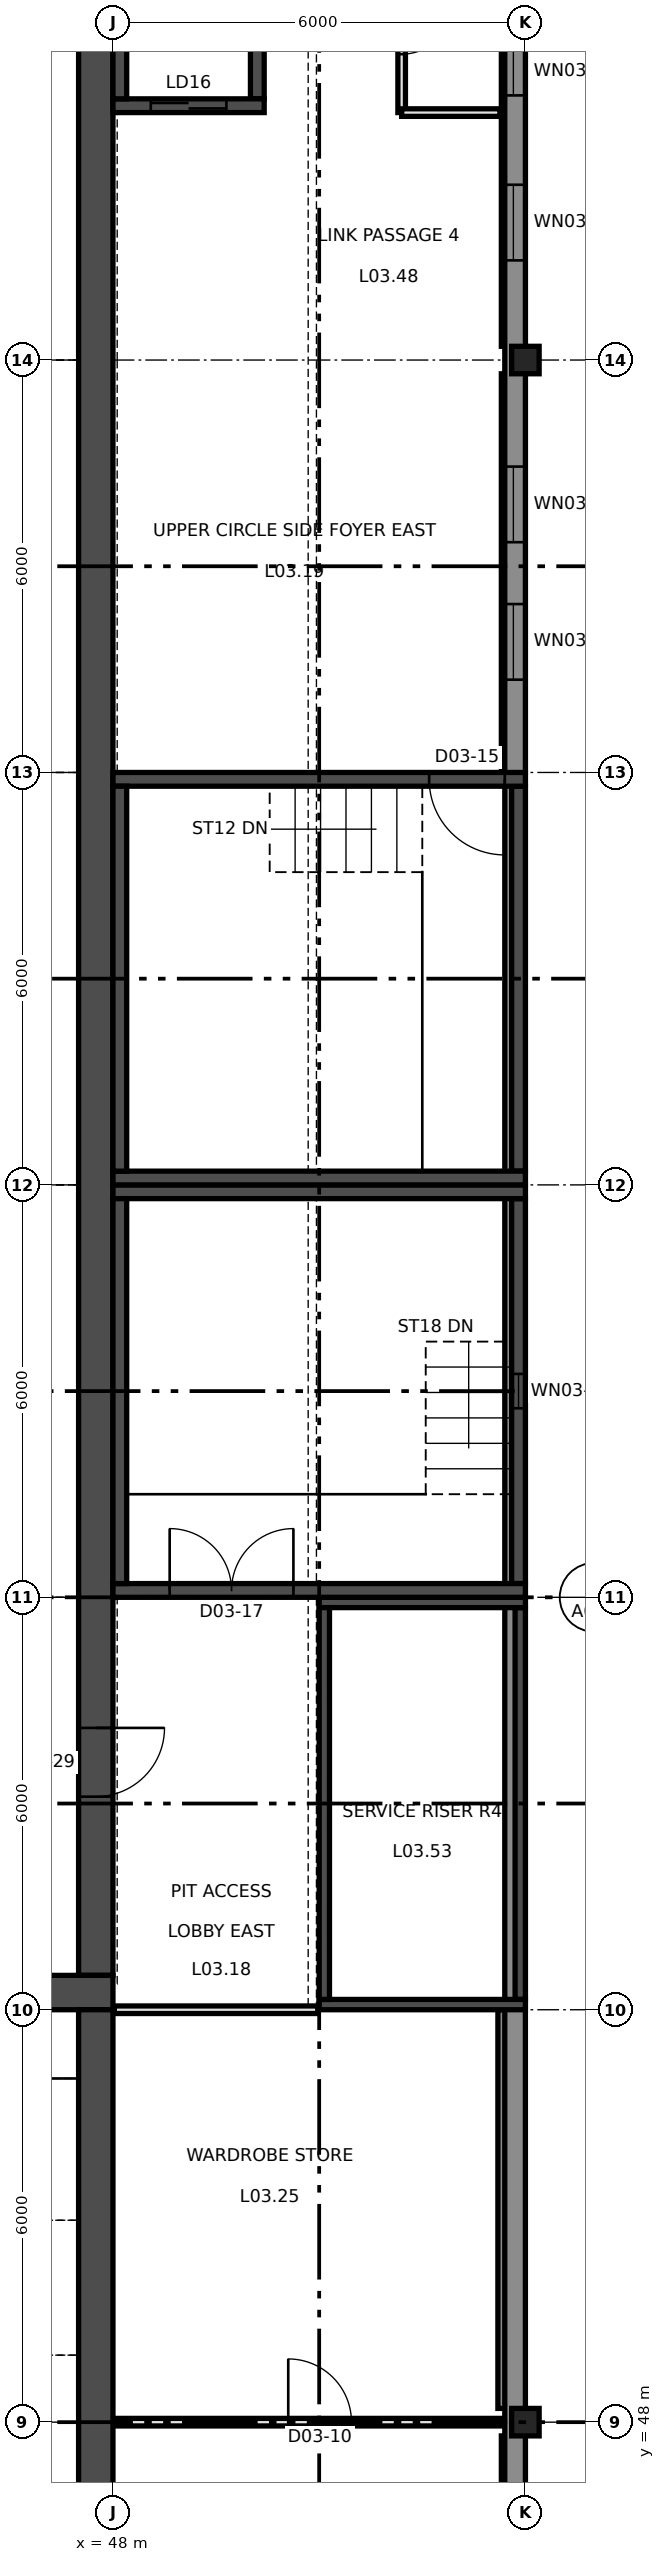
"""IFC4 building model, lengths in metres.
Left out: names, types, materials, properties, quantities, classifications, styles, units other than length and angle.
Written with IfcOpenShell. Run it as: python <this file> out.ifc"""

import sys

from ifc_helpers import new_model, si_unit, direction, frame, frame_2d, origin, origin_2d, place, context, subcontext, project, spatial, rectangle, extrude, element, fill, save


model = new_model("IFC4")
c1 = context("Model", 3, precision=1e-05, world=origin(), true_north=direction((0.0, 1.0)))
c2 = subcontext(c1, "Body", "Model", "MODEL_VIEW")
j1 = project(units=[si_unit("LENGTHUNIT", "METRE"), si_unit("PLANEANGLEUNIT", "RADIAN")], contexts=[c1])
p1 = place(None, origin())
s1 = spatial("IfcSite", under=j1, at=p1, CompositionType="ELEMENT")
p2 = place(p1, origin())
s2 = spatial("IfcBuilding", under=s1, at=p2, CompositionType="ELEMENT")
p3 = place(p2, frame((0.0, 0.0, 16.5)))
s3 = spatial("IfcBuildingStorey", under=s2, at=p3, CompositionType="ELEMENT", Elevation=16.5)
for number, where, z_axis, x_axis in (
    (1, (54.0, 48.0, 0.0), (0.0, 0.0, 1.0), (1.0, 0.0, 0.0)),
    (2, (54.0, 78.0, 0.0), (0.0, 0.0, 1.0), (1.0, 0.0, 0.0)),
):
    element("IfcColumn", number, at=place(p3, frame(where, z_axis=z_axis, x_axis=x_axis)), inside=s3, PredefinedType="COLUMN", context=c2, shape_type="SweptSolid", body=[
        extrude(rectangle(XDim=0.4, YDim=0.4, at=origin_2d()), origin(), (0.0, 0.0, 1.0), 4.5),
    ])
p4 = place(p3, frame((48.0, 71.9, 0.0), z_axis=(0.0, 0.0, 1.0), x_axis=(1.0, 0.0, 0.0)))
e3 = element("IfcWall", 3, at=p4, inside=s3, PredefinedType="SHEAR", context=c2, shape_type="SweptSolid", body=[
    extrude(rectangle(XDim=6.0, YDim=0.2, at=frame_2d((3.0, 0.0))), origin(), (0.0, 0.0, 1.0), 4.422),
])
p5 = place(p4, frame((4.6, 0.0, 0.0)))
e4 = element("IfcOpeningElement", 4, at=p5, cuts=e3, PredefinedType="OPENING", context=c2, shape_type="SweptSolid", body=[
    extrude(rectangle(XDim=1.1, YDim=2.2, at=frame_2d((0.55, 1.1))), frame((0.0, 0.11, 0.0), z_axis=(0.0, -1.0, 0.0), x_axis=(1.0, 0.0, 0.0)), (0.0, 0.0, 1.0), 0.22),
])
p6 = place(p3, frame((48.0, 66.1, 0.0), z_axis=(0.0, 0.0, 1.0), x_axis=(1.0, 0.0, 0.0)))
e5 = element("IfcWall", 5, at=p6, inside=s3, PredefinedType="SHEAR", context=c2, shape_type="SweptSolid", body=[
    extrude(rectangle(XDim=6.0, YDim=0.2, at=frame_2d((3.0, 0.0))), origin(), (0.0, 0.0, 1.0), 4.422),
])
p7 = place(p3, frame((48.1, 66.2, 0.0), z_axis=(0.0, 0.0, 1.0), x_axis=(0.0, 1.0, 0.0)))
e6 = element("IfcWall", 6, at=p7, inside=s3, PredefinedType="SHEAR", context=c2, shape_type="SweptSolid", body=[
    extrude(rectangle(XDim=5.6, YDim=0.2, at=frame_2d((2.8, 0.0))), origin(), (0.0, 0.0, 1.0), 4.422),
])
p8 = place(p3, frame((53.9, 66.2, 0.0), z_axis=(0.0, 0.0, 1.0), x_axis=(0.0, 1.0, 0.0)))
e7 = element("IfcWall", 7, at=p8, inside=s3, PredefinedType="SHEAR", context=c2, shape_type="SweptSolid", body=[
    extrude(rectangle(XDim=5.6, YDim=0.2, at=frame_2d((2.8, 0.0))), origin(), (0.0, 0.0, 1.0), 4.5),
])
p9 = place(p3, frame((48.0, 65.9, 0.0), z_axis=(0.0, 0.0, 1.0), x_axis=(1.0, 0.0, 0.0)))
e8 = element("IfcWall", 8, at=p9, inside=s3, PredefinedType="SHEAR", context=c2, shape_type="SweptSolid", body=[
    extrude(rectangle(XDim=6.0, YDim=0.2, at=frame_2d((3.0, 0.0))), origin(), (0.0, 0.0, 1.0), 4.422),
])
p10 = place(p3, frame((48.0, 60.1, 0.0), z_axis=(0.0, 0.0, 1.0), x_axis=(1.0, 0.0, 0.0)))
e9 = element("IfcWall", 9, at=p10, inside=s3, PredefinedType="SHEAR", context=c2, shape_type="SweptSolid", body=[
    extrude(rectangle(XDim=6.0, YDim=0.2, at=frame_2d((3.0, 0.0))), origin(), (0.0, 0.0, 1.0), 4.422),
])
p11 = place(p10, frame((0.825, 0.0, 0.0)))
e10 = element("IfcOpeningElement", 10, at=p11, cuts=e9, PredefinedType="OPENING", context=c2, shape_type="SweptSolid", body=[
    extrude(rectangle(XDim=1.8, YDim=2.2, at=frame_2d((0.9, 1.1))), frame((0.0, 0.11, 0.0), z_axis=(0.0, -1.0, 0.0), x_axis=(1.0, 0.0, 0.0)), (0.0, 0.0, 1.0), 0.22),
])
p12 = place(p3, frame((48.1, 60.2, 0.0), z_axis=(0.0, 0.0, 1.0), x_axis=(0.0, 1.0, 0.0)))
e11 = element("IfcWall", 11, at=p12, inside=s3, PredefinedType="SHEAR", context=c2, shape_type="SweptSolid", body=[
    extrude(rectangle(XDim=5.6, YDim=0.2, at=frame_2d((2.8, 0.0))), origin(), (0.0, 0.0, 1.0), 4.422),
])
p13 = place(p3, frame((53.9, 60.2, 0.0), z_axis=(0.0, 0.0, 1.0), x_axis=(0.0, 1.0, 0.0)))
e12 = element("IfcWall", 12, at=p13, inside=s3, PredefinedType="SHEAR", context=c2, shape_type="SweptSolid", body=[
    extrude(rectangle(XDim=5.6, YDim=0.2, at=frame_2d((2.8, 0.0))), origin(), (0.0, 0.0, 1.0), 4.5),
])
p14 = place(p13, frame((2.55, 0.0, 0.9)))
e13 = element("IfcOpeningElement", 13, at=p14, cuts=e12, PredefinedType="OPENING", context=c2, shape_type="SweptSolid", body=[
    extrude(rectangle(XDim=0.5, YDim=2.1, at=frame_2d((0.25, 1.05))), frame((0.0, 0.11, 0.0), z_axis=(0.0, -1.0, 0.0), x_axis=(1.0, 0.0, 0.0)), (0.0, 0.0, 1.0), 0.22),
])
p15 = place(p3, frame((48.0, 81.7, 0.0), z_axis=(0.0, 0.0, 1.0), x_axis=(1.0, 0.0, 0.0)))
e14 = element("IfcWall", 14, at=p15, inside=s3, PredefinedType="SHEAR", context=c2, shape_type="SweptSolid", body=[
    extrude(rectangle(XDim=2.2, YDim=0.2, at=frame_2d((1.1, 0.0))), origin(), (0.0, 0.0, 1.0), 4.422),
])
p16 = place(p15, frame((0.55, 0.0, 0.0)))
e15 = element("IfcOpeningElement", 15, at=p16, cuts=e14, PredefinedType="OPENING", context=c2, shape_type="SweptSolid", body=[
    extrude(rectangle(XDim=1.1, YDim=2.1, at=frame_2d((0.55, 1.05))), frame((0.0, 0.11, 0.0), z_axis=(0.0, -1.0, 0.0), x_axis=(1.0, 0.0, 0.0)), (0.0, 0.0, 1.0), 0.22),
])
p17 = place(p3, frame((48.1, 81.8, 0.0), z_axis=(0.0, 0.0, 1.0), x_axis=(0.0, 1.0, 0.0)))
e16 = element("IfcWall", 16, at=p17, inside=s3, PredefinedType="SHEAR", context=c2, shape_type="SweptSolid", body=[
    extrude(rectangle(XDim=2.0, YDim=0.2, at=frame_2d((1.0, 0.0))), origin(), (0.0, 0.0, 1.0), 4.422),
])
p18 = place(p3, frame((50.1, 81.8, 0.0), z_axis=(0.0, 0.0, 1.0), x_axis=(0.0, 1.0, 0.0)))
e17 = element("IfcWall", 17, at=p18, inside=s3, PredefinedType="SHEAR", context=c2, shape_type="SweptSolid", body=[
    extrude(rectangle(XDim=2.0, YDim=0.2, at=frame_2d((1.0, 0.0))), origin(), (0.0, 0.0, 1.0), 4.5),
])
for number, where, z_axis, x_axis in (
    (18, (51.0, 59.925, 0.0), (0.0, 0.0, 1.0), (1.0, 0.0, 0.0)),
    (19, (51.0, 54.075, 0.0), (0.0, 0.0, 1.0), (1.0, 0.0, 0.0)),
):
    element("IfcWall", number, at=place(p3, frame(where, z_axis=z_axis, x_axis=x_axis)), inside=s3, PredefinedType="SHEAR", context=c2, shape_type="SweptSolid", body=[
        extrude(rectangle(XDim=3.0, YDim=0.15, at=frame_2d((1.5, 0.0))), origin(), (0.0, 0.0, 1.0), 4.5),
    ])
for number, where, z_axis, x_axis in (
    (20, (51.075, 54.15, 0.0), (0.0, 0.0, 1.0), (0.0, 1.0, 0.0)),
    (21, (53.925, 54.15, 0.0), (0.0, 0.0, 1.0), (0.0, 1.0, 0.0)),
):
    element("IfcWall", number, at=place(p3, frame(where, z_axis=z_axis, x_axis=x_axis)), inside=s3, PredefinedType="SHEAR", context=c2, shape_type="SweptSolid", body=[
        extrude(rectangle(XDim=5.7, YDim=0.15, at=frame_2d((2.85, 0.0))), origin(), (0.0, 0.0, 1.0), 4.5),
    ])
p19 = place(p3, frame((47.75, 54.5, 0.0), z_axis=(0.0, 0.0, 1.0), x_axis=(0.0, 1.0, 0.0)))
e22 = element("IfcWall", 22, at=p19, inside=s3, PredefinedType="SHEAR", context=c2, shape_type="SweptSolid", body=[
    extrude(rectangle(XDim=35.5, YDim=0.5, at=frame_2d((17.75, 0.0))), origin(), (0.0, 0.0, 1.0), 3.9),
])
p20 = place(p19, frame((29.35, 0.0, 0.0)))
e23 = element("IfcOpeningElement", 23, at=p20, cuts=e22, PredefinedType="OPENING", context=c2, shape_type="SweptSolid", body=[
    extrude(rectangle(XDim=1.3, YDim=2.1, at=frame_2d((0.65, 1.05))), frame((0.0, 0.26, 0.0), z_axis=(0.0, -1.0, 0.0), x_axis=(1.0, 0.0, 0.0)), (0.0, 0.0, 1.0), 0.52),
])
p21 = place(p19, frame((2.6, 0.0, 0.0)))
e24 = element("IfcOpeningElement", 24, at=p21, cuts=e22, PredefinedType="OPENING", context=c2, shape_type="SweptSolid", body=[
    extrude(rectangle(XDim=1.0, YDim=2.1, at=frame_2d((0.5, 1.05))), frame((0.0, 0.26, 0.0), z_axis=(0.0, -1.0, 0.0), x_axis=(1.0, 0.0, 0.0)), (0.0, 0.0, 1.0), 0.52),
])
p22 = place(p3, frame((47.75, 30.0, 0.0), z_axis=(0.0, 0.0, 1.0), x_axis=(0.0, 1.0, 0.0)))
e25 = element("IfcWall", 25, at=p22, inside=s3, PredefinedType="SHEAR", context=c2, shape_type="SweptSolid", body=[
    extrude(rectangle(XDim=24.0, YDim=0.5, at=frame_2d((12.0, 0.0))), origin(), (0.0, 0.0, 1.0), 6.5),
])
p23 = place(p3, frame((18.0, 54.25, 0.0), z_axis=(0.0, 0.0, 1.0), x_axis=(1.0, 0.0, 0.0)))
e26 = element("IfcWall", 26, at=p23, inside=s3, PredefinedType="SHEAR", context=c2, shape_type="SweptSolid", body=[
    extrude(rectangle(XDim=30.0, YDim=0.5, at=frame_2d((15.0, 0.0))), origin(), (0.0, 0.0, 1.0), 6.5),
])
p24 = place(p3, frame((53.825, 83.8, 0.0), z_axis=(0.0, 0.0, 1.0), x_axis=(0.0, -1.0, 0.0)))
e27 = element("IfcWall", 27, at=p24, inside=s3, PredefinedType="SOLIDWALL", context=c2, shape_type="SweptSolid", body=[
    extrude(rectangle(XDim=5.6, YDim=0.35, at=frame_2d((2.8, 0.0))), origin(), (0.0, 0.0, 1.0), 3.9),
])
p25 = place(p24, frame((1.25, 0.0, 2.4)))
e28 = element("IfcOpeningElement", 28, at=p25, cuts=e27, PredefinedType="OPENING", context=c2, shape_type="SweptSolid", body=[
    extrude(rectangle(XDim=0.7, YDim=1.1, at=frame_2d((0.35, 0.55))), frame((0.0, 0.185, 0.0), z_axis=(0.0, -1.0, 0.0), x_axis=(1.0, 0.0, 0.0)), (0.0, 0.0, 1.0), 0.37),
])
p26 = place(p24, frame((3.25, 0.0, 2.4)))
e29 = element("IfcOpeningElement", 29, at=p26, cuts=e27, PredefinedType="OPENING", context=c2, shape_type="SweptSolid", body=[
    extrude(rectangle(XDim=1.1, YDim=1.1, at=frame_2d((0.55, 0.55))), frame((0.0, 0.185, 0.0), z_axis=(0.0, -1.0, 0.0), x_axis=(1.0, 0.0, 0.0)), (0.0, 0.0, 1.0), 0.37),
])
p27 = place(p3, frame((53.825, 77.8, 0.0), z_axis=(0.0, 0.0, 1.0), x_axis=(0.0, -1.0, 0.0)))
e30 = element("IfcWall", 30, at=p27, inside=s3, PredefinedType="SOLIDWALL", context=c2, shape_type="SweptSolid", body=[
    extrude(rectangle(XDim=5.8, YDim=0.35, at=frame_2d((2.9, 0.0))), origin(), (0.0, 0.0, 1.0), 3.9),
])
p28 = place(p27, frame((1.35, 0.0, 2.4)))
e31 = element("IfcOpeningElement", 31, at=p28, cuts=e30, PredefinedType="OPENING", context=c2, shape_type="SweptSolid", body=[
    extrude(rectangle(XDim=1.1, YDim=1.1, at=frame_2d((0.55, 0.55))), frame((0.0, 0.185, 0.0), z_axis=(0.0, -1.0, 0.0), x_axis=(1.0, 0.0, 0.0)), (0.0, 0.0, 1.0), 0.37),
])
p29 = place(p27, frame((3.35, 0.0, 2.4)))
e32 = element("IfcOpeningElement", 32, at=p29, cuts=e30, PredefinedType="OPENING", context=c2, shape_type="SweptSolid", body=[
    extrude(rectangle(XDim=1.1, YDim=1.1, at=frame_2d((0.55, 0.55))), frame((0.0, 0.185, 0.0), z_axis=(0.0, -1.0, 0.0), x_axis=(1.0, 0.0, 0.0)), (0.0, 0.0, 1.0), 0.37),
])
p30 = place(p3, frame((53.775, 54.0, 0.0), z_axis=(0.0, 0.0, 1.0), x_axis=(0.0, -1.0, 0.0)))
e33 = element("IfcWall", 33, at=p30, inside=s3, PredefinedType="SOLIDWALL", context=c2, shape_type="SweptSolid", body=[
    extrude(rectangle(XDim=5.8, YDim=0.35, at=frame_2d((2.9, 0.0))), origin(), (0.0, 0.0, 1.0), 3.9),
])
p31 = place(p3, frame((53.825, 47.8, 0.0), z_axis=(0.0, 0.0, 1.0), x_axis=(0.0, -1.0, 0.0)))
e34 = element("IfcWall", 34, at=p31, inside=s3, PredefinedType="SOLIDWALL", context=c2, shape_type="SweptSolid", body=[
    extrude(rectangle(XDim=5.8, YDim=0.35, at=frame_2d((2.9, 0.0))), origin(), (0.0, 0.0, 1.0), 3.9),
])
p32 = place(p31, frame((1.35, 0.0, 2.4)))
e35 = element("IfcOpeningElement", 35, at=p32, cuts=e34, PredefinedType="OPENING", context=c2, shape_type="SweptSolid", body=[
    extrude(rectangle(XDim=1.1, YDim=1.1, at=frame_2d((0.55, 0.55))), frame((0.0, 0.185, 0.0), z_axis=(0.0, -1.0, 0.0), x_axis=(1.0, 0.0, 0.0)), (0.0, 0.0, 1.0), 0.37),
])
p33 = place(p31, frame((3.35, 0.0, 2.4)))
e36 = element("IfcOpeningElement", 36, at=p33, cuts=e34, PredefinedType="OPENING", context=c2, shape_type="SweptSolid", body=[
    extrude(rectangle(XDim=1.1, YDim=1.1, at=frame_2d((0.55, 0.55))), frame((0.0, 0.185, 0.0), z_axis=(0.0, -1.0, 0.0), x_axis=(1.0, 0.0, 0.0)), (0.0, 0.0, 1.0), 0.37),
])
p34 = place(p3, frame((53.85, 30.0, 4.5), z_axis=(0.0, 0.0, 1.0), x_axis=(0.0, 1.0, 0.0)))
e37 = element("IfcWall", 37, at=p34, inside=s3, PredefinedType="PARAPET", context=c2, shape_type="SweptSolid", body=[
    extrude(rectangle(XDim=60.0, YDim=0.3, at=frame_2d((30.0, 0.0))), origin(), (0.0, 0.0, 1.0), 1.2),
])
p35 = place(p3, frame((48.02, 48.0, 0.0), z_axis=(0.0, 0.0, 1.0), x_axis=(1.0, 0.0, 0.0)))
e38 = element("IfcWall", 38, at=p35, inside=s3, PredefinedType="PARTITIONING", context=c2, shape_type="SweptSolid", body=[
    extrude(rectangle(XDim=5.66, YDim=0.11, at=frame_2d((2.83, 0.0))), origin(), (0.0, 0.0, 1.0), 4.28),
])
p36 = place(p35, frame((2.53, 0.0, 0.0)))
e39 = element("IfcOpeningElement", 39, at=p36, cuts=e38, PredefinedType="OPENING", context=c2, shape_type="SweptSolid", body=[
    extrude(rectangle(XDim=0.92, YDim=2.04, at=frame_2d((0.46, 1.02))), frame((0.0, 0.065, 0.0), z_axis=(0.0, -1.0, 0.0), x_axis=(1.0, 0.0, 0.0)), (0.0, 0.0, 1.0), 0.13),
])
p37 = place(p3, frame((48.02, 54.0, 0.0), z_axis=(0.0, 0.0, 1.0), x_axis=(1.0, 0.0, 0.0)))
e40 = element("IfcWall", 40, at=p37, inside=s3, PredefinedType="PARTITIONING", context=c2, shape_type="SweptSolid", body=[
    extrude(rectangle(XDim=2.96, YDim=0.11, at=frame_2d((1.48, 0.0))), origin(), (0.0, 0.0, 1.0), 3.9),
])
p38 = place(p3, frame((52.2, 81.6, 0.0), z_axis=(0.0, 0.0, 1.0), x_axis=(0.0, 1.0, 0.0)))
e41 = element("IfcWall", 41, at=p38, inside=s3, PredefinedType="PARTITIONING", context=c2, shape_type="SweptSolid", body=[
    extrude(rectangle(XDim=2.4, YDim=0.11, at=frame_2d((1.2, 0.0))), origin(), (0.0, 0.0, 1.0), 4.28),
])
p39 = place(p38, frame((0.85, 0.0, 0.0)))
e42 = element("IfcOpeningElement", 42, at=p39, cuts=e41, PredefinedType="OPENING", context=c2, shape_type="SweptSolid", body=[
    extrude(rectangle(XDim=0.75, YDim=2.04, at=frame_2d((0.375, 1.02))), frame((0.0, 0.065, 0.0), z_axis=(0.0, -1.0, 0.0), x_axis=(1.0, 0.0, 0.0)), (0.0, 0.0, 1.0), 0.13),
])
p40 = place(p3, frame((52.2, 81.6, 0.0), z_axis=(0.0, 0.0, 1.0), x_axis=(1.0, 0.0, 0.0)))
e43 = element("IfcWall", 43, at=p40, inside=s3, PredefinedType="PARTITIONING", context=c2, shape_type="SweptSolid", body=[
    extrude(rectangle(XDim=1.43, YDim=0.11, at=frame_2d((0.715, 0.0))), origin(), (0.0, 0.0, 1.0), 4.28),
])
p41 = place(p25, origin())
e44 = element("IfcWindow", 44, at=p41, inside=s3, PartitioningType="SINGLE_PANEL", PredefinedType="WINDOW", context=c2, shape_type="SweptSolid", body=[
    extrude(rectangle(XDim=0.7, YDim=1.1, at=frame_2d((0.35, 0.55))), frame((0.0, 0.03, 0.0), z_axis=(0.0, -1.0, 0.0), x_axis=(1.0, 0.0, 0.0)), (0.0, 0.0, 1.0), 0.06),
])
fill(e28, e44)
p42 = place(p26, origin())
e45 = element("IfcWindow", 45, at=p42, inside=s3, PartitioningType="SINGLE_PANEL", PredefinedType="WINDOW", context=c2, shape_type="SweptSolid", body=[
    extrude(rectangle(XDim=1.1, YDim=1.1, at=frame_2d((0.55, 0.55))), frame((0.0, 0.03, 0.0), z_axis=(0.0, -1.0, 0.0), x_axis=(1.0, 0.0, 0.0)), (0.0, 0.0, 1.0), 0.06),
])
fill(e29, e45)
p43 = place(p28, origin())
e46 = element("IfcWindow", 46, at=p43, inside=s3, PartitioningType="SINGLE_PANEL", PredefinedType="WINDOW", context=c2, shape_type="SweptSolid", body=[
    extrude(rectangle(XDim=1.1, YDim=1.1, at=frame_2d((0.55, 0.55))), frame((0.0, 0.03, 0.0), z_axis=(0.0, -1.0, 0.0), x_axis=(1.0, 0.0, 0.0)), (0.0, 0.0, 1.0), 0.06),
])
fill(e31, e46)
p44 = place(p29, origin())
e47 = element("IfcWindow", 47, at=p44, inside=s3, PartitioningType="SINGLE_PANEL", PredefinedType="WINDOW", context=c2, shape_type="SweptSolid", body=[
    extrude(rectangle(XDim=1.1, YDim=1.1, at=frame_2d((0.55, 0.55))), frame((0.0, 0.03, 0.0), z_axis=(0.0, -1.0, 0.0), x_axis=(1.0, 0.0, 0.0)), (0.0, 0.0, 1.0), 0.06),
])
fill(e32, e47)
p45 = place(p14, origin())
e48 = element("IfcWindow", 48, at=p45, inside=s3, PartitioningType="SINGLE_PANEL", PredefinedType="WINDOW", context=c2, shape_type="SweptSolid", body=[
    extrude(rectangle(XDim=0.5, YDim=2.1, at=frame_2d((0.25, 1.05))), frame((0.0, 0.03, 0.0), z_axis=(0.0, -1.0, 0.0), x_axis=(1.0, 0.0, 0.0)), (0.0, 0.0, 1.0), 0.06),
])
fill(e13, e48)
p46 = place(p36, origin())
e49 = element("IfcDoor", 49, at=p46, inside=s3, OperationType="SINGLE_SWING_LEFT", PredefinedType="DOOR", context=c2, shape_type="SweptSolid", body=[
    extrude(rectangle(XDim=0.92, YDim=2.04, at=frame_2d((0.46, 1.02))), frame((0.0, 0.025, 0.0), z_axis=(0.0, -1.0, 0.0), x_axis=(1.0, 0.0, 0.0)), (0.0, 0.0, 1.0), 0.05),
])
fill(e39, e49)
p47 = place(p5, frame((1.1, 0.0, 0.0), z_axis=(0.0, 0.0, 1.0), x_axis=(-1.0, 0.0, 0.0)))
e50 = element("IfcDoor", 50, at=p47, inside=s3, OperationType="SINGLE_SWING_RIGHT", PredefinedType="DOOR", context=c2, shape_type="SweptSolid", body=[
    extrude(rectangle(XDim=1.1, YDim=2.2, at=frame_2d((0.55, 1.1))), frame((0.0, 0.025, 0.0), z_axis=(0.0, -1.0, 0.0), x_axis=(1.0, 0.0, 0.0)), (0.0, 0.0, 1.0), 0.05),
])
fill(e4, e50)
p48 = place(p11, origin())
e51 = element("IfcDoor", 51, at=p48, inside=s3, OperationType="DOUBLE_DOOR_SINGLE_SWING", PredefinedType="DOOR", context=c2, shape_type="SweptSolid", body=[
    extrude(rectangle(XDim=1.8, YDim=2.2, at=frame_2d((0.9, 1.1))), frame((0.0, 0.025, 0.0), z_axis=(0.0, -1.0, 0.0), x_axis=(1.0, 0.0, 0.0)), (0.0, 0.0, 1.0), 0.05),
])
fill(e10, e51)
p49 = place(p39, frame((0.75, 0.0, 0.0), z_axis=(0.0, 0.0, 1.0), x_axis=(-1.0, 0.0, 0.0)))
e52 = element("IfcDoor", 52, at=p49, inside=s3, OperationType="SINGLE_SWING_RIGHT", PredefinedType="DOOR", context=c2, shape_type="SweptSolid", body=[
    extrude(rectangle(XDim=0.75, YDim=2.04, at=frame_2d((0.375, 1.02))), frame((0.0, 0.025, 0.0), z_axis=(0.0, -1.0, 0.0), x_axis=(1.0, 0.0, 0.0)), (0.0, 0.0, 1.0), 0.05),
])
fill(e42, e52)
p50 = place(p21, frame((1.0, 0.0, 0.0), z_axis=(0.0, 0.0, 1.0), x_axis=(-1.0, 0.0, 0.0)))
e53 = element("IfcDoor", 53, at=p50, inside=s3, OperationType="SINGLE_SWING_RIGHT", PredefinedType="DOOR", context=c2, shape_type="SweptSolid", body=[
    extrude(rectangle(XDim=1.0, YDim=2.1, at=frame_2d((0.5, 1.05))), frame((0.0, 0.025, 0.0), z_axis=(0.0, -1.0, 0.0), x_axis=(1.0, 0.0, 0.0)), (0.0, 0.0, 1.0), 0.05),
])
fill(e24, e53)
p51 = place(p16, origin())
e54 = element("IfcDoor", 54, at=p51, inside=s3, OperationType="DOUBLE_DOOR_SLIDING", PredefinedType="DOOR", context=c2, shape_type="SweptSolid", body=[
    extrude(rectangle(XDim=1.1, YDim=2.1, at=frame_2d((0.55, 1.05))), frame((0.0, 0.025, 0.0), z_axis=(0.0, -1.0, 0.0), x_axis=(1.0, 0.0, 0.0)), (0.0, 0.0, 1.0), 0.05),
])
fill(e15, e54)
save(model, sys.argv[1])
